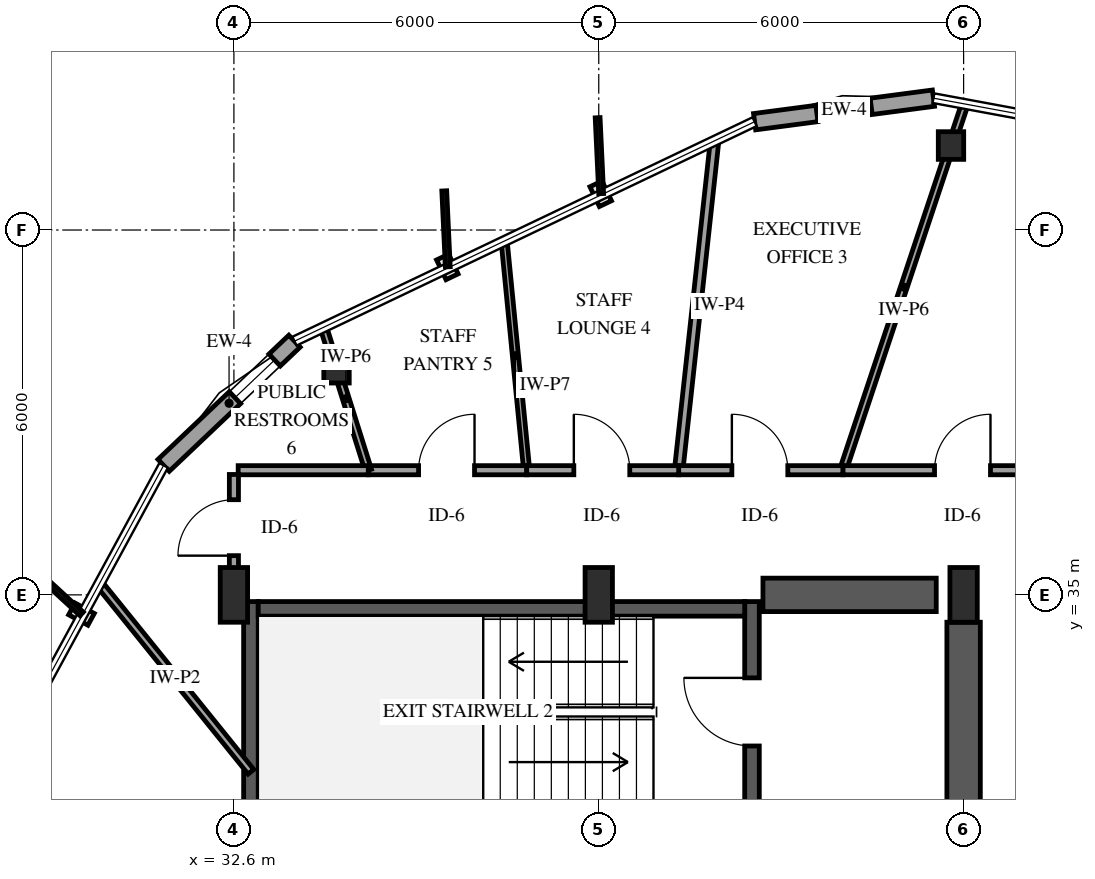
"""IFC4 building model, lengths in metres.
Left out: names, types, materials, properties, quantities, classifications, styles, units other than length and angle.
Written with IfcOpenShell. Run it as: python <this file> out.ifc"""

import sys

from ifc_helpers import new_model, si_unit, direction, frame, frame_2d, origin, origin_2d, place, context, subcontext, project, spatial, rectangle, i_section, extrude, element, fill, save


model = new_model("IFC4")
c1 = context("Model", 3, precision=1e-05, world=origin(), true_north=direction((0.0, 1.0)))
c2 = subcontext(c1, "Body", "Model", "MODEL_VIEW")
j1 = project(units=[si_unit("LENGTHUNIT", "METRE"), si_unit("PLANEANGLEUNIT", "RADIAN")], contexts=[c1])
p1 = place(None, origin())
s1 = spatial("IfcSite", under=j1, at=p1, CompositionType="ELEMENT")
p2 = place(p1, origin())
s2 = spatial("IfcBuilding", under=s1, at=p2, CompositionType="ELEMENT")
p3 = place(p2, frame((0.0, 0.0, 126.4)))
s3 = spatial("IfcBuildingStorey", under=s2, at=p3, CompositionType="ELEMENT", Elevation=126.4)
p4 = place(p3, frame((32.88, 31.26, 0.0), z_axis=(0.0, 0.0, 1.0), x_axis=(0.0, 1.0, 0.0)))
e1 = element("IfcWall", 1, at=p4, inside=s3, PredefinedType="SHEAR", context=c2, shape_type="SweptSolid", body=[
    extrude(rectangle(XDim=3.63, YDim=0.24, at=frame_2d((1.815, 0.0))), origin(), (0.0, 0.0, 1.0), 3.9),
])
p5 = place(p3, frame((41.12, 31.26, 0.0), z_axis=(0.0, 0.0, 1.0), x_axis=(0.0, 1.0, 0.0)))
e2 = element("IfcWall", 2, at=p5, inside=s3, PredefinedType="SHEAR", context=c2, shape_type="SweptSolid", body=[
    extrude(rectangle(XDim=3.63, YDim=0.24, at=frame_2d((1.815, 0.0))), origin(), (0.0, 0.0, 1.0), 3.9),
])
p6 = place(p5, frame((1.255, 0.0, 0.0)))
e3 = element("IfcOpeningElement", 3, at=p6, cuts=e2, PredefinedType="OPENING", context=c2, shape_type="SweptSolid", body=[
    extrude(rectangle(XDim=1.12, YDim=2.15, at=frame_2d((0.56, 1.075))), frame((0.0, 0.13, 0.0), z_axis=(0.0, -1.0, 0.0), x_axis=(1.0, 0.0, 0.0)), (0.0, 0.0, 1.0), 0.26),
])
p7 = place(p3, frame((33.0, 34.77, 0.0), z_axis=(0.0, 0.0, 1.0), x_axis=(1.0, 0.0, 0.0)))
e4 = element("IfcWall", 4, at=p7, inside=s3, PredefinedType="SHEAR", context=c2, shape_type="SweptSolid", body=[
    extrude(rectangle(XDim=8.0, YDim=0.24, at=frame_2d((4.0, 0.0))), origin(), (0.0, 0.0, 1.0), 3.9),
])
p8 = place(p3, frame((41.3, 35.0, 0.0), z_axis=(0.0, 0.0, 1.0), x_axis=(1.0, 0.0, 0.0)))
e5 = element("IfcWall", 5, at=p8, inside=s3, PredefinedType="SHEAR", context=c2, shape_type="SweptSolid", body=[
    extrude(rectangle(XDim=2.85, YDim=0.55, at=frame_2d((1.425, 0.0))), origin(), (0.0, 0.0, 1.0), 3.9),
])
p9 = place(p3, frame((44.6, 29.8, 0.0), z_axis=(0.0, 0.0, 1.0), x_axis=(0.0, 1.0, 0.0)))
e6 = element("IfcWall", 6, at=p9, inside=s3, PredefinedType="SHEAR", context=c2, shape_type="SweptSolid", body=[
    extrude(rectangle(XDim=4.75, YDim=0.55, at=frame_2d((2.375, 0.0))), origin(), (0.0, 0.0, 1.0), 3.9),
])
for number, where, z_axis, x_axis in (
    (7, (32.6, 35.0, 0.0), (0.0, 0.0, 1.0), (1.0, 0.0, 0.0)),
    (8, (38.6, 35.0, 0.0), (0.0, 0.0, 1.0), (1.0, 0.0, 0.0)),
    (9, (44.6, 35.0, 0.0), (0.0, 0.0, 1.0), (1.0, 0.0, 0.0)),
):
    element("IfcColumn", number, at=place(p3, frame(where, z_axis=z_axis, x_axis=x_axis)), inside=s3, PredefinedType="PILASTER", context=c2, shape_type="SweptSolid", body=[
        extrude(rectangle(XDim=0.45, YDim=0.9, at=origin_2d()), origin(), (0.0, 0.0, 1.0), 3.9),
    ])
for number, where, z_axis, x_axis in (
    (10, (44.393, 42.389, 0.0), (0.0, 0.0, 1.0), (1.0, 0.0, 0.0)),
    (11, (34.288, 38.711, 0.0), (0.0, 0.0, 1.0), (1.0, 0.0, 0.0)),
):
    element("IfcColumn", number, at=place(p3, frame(where, z_axis=z_axis, x_axis=x_axis)), inside=s3, PredefinedType="COLUMN", context=c2, shape_type="SweptSolid", body=[
        extrude(i_section(OverallWidth=0.418, OverallDepth=0.455, WebThickness=0.042, FlangeThickness=0.068, FilletRadius=0.038, at=origin_2d()), origin(), (0.0, 0.0, 1.0), 3.9),
    ])
p10 = place(p3, frame((44.104, 43.168, 0.0), z_axis=(0.0, 0.0, 1.0), x_axis=(-0.991434395997, -0.130605660036, 0.0)))
e12 = element("IfcWall", 12, at=p10, inside=s3, PredefinedType="SOLIDWALL", context=c2, shape_type="SweptSolid", body=[
    extrude(rectangle(XDim=2.967, YDim=0.27, at=frame_2d((1.483, 0.0))), origin(), (0.0, 0.0, 1.0), 2.979),
])
p11 = place(p10, frame((1.033, 0.0, 0.75)))
e13 = element("IfcOpeningElement", 13, at=p11, cuts=e12, PredefinedType="OPENING", context=c2, shape_type="SweptSolid", body=[
    extrude(rectangle(XDim=0.9, YDim=1.5, at=frame_2d((0.45, 0.75))), frame((0.0, 0.145, 0.0), z_axis=(0.0, -1.0, 0.0), x_axis=(1.0, 0.0, 0.0)), (0.0, 0.0, 1.0), 0.29),
])
p12 = place(p3, frame((33.596, 39.172, 0.0), z_axis=(0.0, 0.0, 1.0), x_axis=(-0.725340416539, -0.688390354476, 0.0)))
e14 = element("IfcWall", 14, at=p12, inside=s3, PredefinedType="SOLIDWALL", context=c2, shape_type="SweptSolid", body=[
    extrude(rectangle(XDim=2.967, YDim=0.27, at=frame_2d((1.483, 0.0))), origin(), (0.0, 0.0, 1.0), 2.979),
])
p13 = place(p12, frame((0.45, 0.0, 0.75)))
e15 = element("IfcOpeningElement", 15, at=p13, cuts=e14, PredefinedType="OPENING", context=c2, shape_type="SweptSolid", body=[
    extrude(rectangle(XDim=0.9, YDim=1.5, at=frame_2d((0.45, 0.75))), frame((0.0, 0.145, 0.0), z_axis=(0.0, -1.0, 0.0), x_axis=(1.0, 0.0, 0.0)), (0.0, 0.0, 1.0), 0.29),
])
p14 = place(p3, frame((42.614, 37.05, 0.0), z_axis=(0.0, 0.0, 1.0), x_axis=(0.316147007212, 0.948710213833, 0.0)))
e16 = element("IfcWall", 16, at=p14, inside=s3, PredefinedType="PARTITIONING", context=c2, shape_type="SweptSolid", body=[
    extrude(rectangle(XDim=6.349, YDim=0.11, at=frame_2d((3.174, 0.0))), origin(), (0.0, 0.0, 1.0), 2.895),
])
p15 = place(p3, frame((39.914, 37.05, 0.0), z_axis=(0.0, 0.0, 1.0), x_axis=(0.108424969243, 0.99410463536, 0.0)))
e17 = element("IfcWall", 17, at=p15, inside=s3, PredefinedType="PARTITIONING", context=c2, shape_type="SweptSolid", body=[
    extrude(rectangle(XDim=5.449, YDim=0.14, at=frame_2d((2.725, 0.0))), origin(), (0.0, 0.0, 1.0), 3.6),
])
p16 = place(p3, frame((32.88, 32.091, 0.0), z_axis=(0.0, 0.0, 1.0), x_axis=(-0.627801721524, 0.778373302761, 0.0)))
e18 = element("IfcWall", 18, at=p16, inside=s3, PredefinedType="PARTITIONING", context=c2, shape_type="SweptSolid", body=[
    extrude(rectangle(XDim=3.971, YDim=0.12, at=frame_2d((1.985, 0.0))), origin(), (0.0, 0.0, 1.0), 3.6),
])
p17 = place(p3, frame((42.614, 37.05, 0.0), z_axis=(0.0, 0.0, 1.0), x_axis=(1.0, 0.0, 0.0)))
e19 = element("IfcWall", 19, at=p17, inside=s3, PredefinedType="PARTITIONING", context=c2, shape_type="SweptSolid", body=[
    extrude(rectangle(XDim=3.966, YDim=0.15, at=frame_2d((1.983, 0.0))), origin(), (0.0, 0.0, 1.0), 3.6),
])
p18 = place(p17, frame((1.508, 0.0, 0.0)))
e20 = element("IfcOpeningElement", 20, at=p18, cuts=e19, PredefinedType="OPENING", context=c2, shape_type="SweptSolid", body=[
    extrude(rectangle(XDim=0.92, YDim=2.12, at=frame_2d((0.46, 1.06))), frame((0.0, 0.085, 0.0), z_axis=(0.0, -1.0, 0.0), x_axis=(1.0, 0.0, 0.0)), (0.0, 0.0, 1.0), 0.17),
])
p19 = place(p3, frame((37.415, 37.05, 0.0), z_axis=(0.0, 0.0, 1.0), x_axis=(-0.09804116838, 0.995182359823, 0.0)))
e21 = element("IfcWall", 21, at=p19, inside=s3, PredefinedType="PARTITIONING", context=c2, shape_type="SweptSolid", body=[
    extrude(rectangle(XDim=3.785, YDim=0.1, at=frame_2d((1.893, 0.0))), origin(), (0.0, 0.0, 1.0), 3.6),
])
p20 = place(p3, frame((39.914, 37.05, 0.0), z_axis=(0.0, 0.0, 1.0), x_axis=(1.0, 0.0, 0.0)))
e22 = element("IfcWall", 22, at=p20, inside=s3, PredefinedType="PARTITIONING", context=c2, shape_type="SweptSolid", body=[
    extrude(rectangle(XDim=2.7, YDim=0.15, at=frame_2d((1.35, 0.0))), origin(), (0.0, 0.0, 1.0), 3.6),
])
p21 = place(p20, frame((0.875, 0.0, 0.0)))
e23 = element("IfcOpeningElement", 23, at=p21, cuts=e22, PredefinedType="OPENING", context=c2, shape_type="SweptSolid", body=[
    extrude(rectangle(XDim=0.92, YDim=2.12, at=frame_2d((0.46, 1.06))), frame((0.0, 0.085, 0.0), z_axis=(0.0, -1.0, 0.0), x_axis=(1.0, 0.0, 0.0)), (0.0, 0.0, 1.0), 0.17),
])
p22 = place(p3, frame((34.81, 37.05, 0.0), z_axis=(0.0, 0.0, 1.0), x_axis=(1.0, 0.0, 0.0)))
e24 = element("IfcWall", 24, at=p22, inside=s3, PredefinedType="PARTITIONING", context=c2, shape_type="SweptSolid", body=[
    extrude(rectangle(XDim=2.605, YDim=0.15, at=frame_2d((1.302, 0.0))), origin(), (0.0, 0.0, 1.0), 3.6),
])
p23 = place(p22, frame((0.827, 0.0, 0.0)))
e25 = element("IfcOpeningElement", 25, at=p23, cuts=e24, PredefinedType="OPENING", context=c2, shape_type="SweptSolid", body=[
    extrude(rectangle(XDim=0.92, YDim=2.12, at=frame_2d((0.46, 1.06))), frame((0.0, 0.085, 0.0), z_axis=(0.0, -1.0, 0.0), x_axis=(1.0, 0.0, 0.0)), (0.0, 0.0, 1.0), 0.17),
])
p24 = place(p3, frame((37.415, 37.05, 0.0), z_axis=(0.0, 0.0, 1.0), x_axis=(1.0, 0.0, 0.0)))
e26 = element("IfcWall", 26, at=p24, inside=s3, PredefinedType="PARTITIONING", context=c2, shape_type="SweptSolid", body=[
    extrude(rectangle(XDim=2.499, YDim=0.15, at=frame_2d((1.25, 0.0))), origin(), (0.0, 0.0, 1.0), 3.6),
])
p25 = place(p24, frame((0.775, 0.0, 0.0)))
e27 = element("IfcOpeningElement", 27, at=p25, cuts=e26, PredefinedType="OPENING", context=c2, shape_type="SweptSolid", body=[
    extrude(rectangle(XDim=0.92, YDim=2.12, at=frame_2d((0.46, 1.06))), frame((0.0, 0.085, 0.0), z_axis=(0.0, -1.0, 0.0), x_axis=(1.0, 0.0, 0.0)), (0.0, 0.0, 1.0), 0.17),
])
p26 = place(p3, frame((34.81, 37.05, 0.0), z_axis=(0.0, 0.0, 1.0), x_axis=(-0.300120490278, 0.953901300615, 0.0)))
e28 = element("IfcWall", 28, at=p26, inside=s3, PredefinedType="PARTITIONING", context=c2, shape_type="SweptSolid", body=[
    extrude(rectangle(XDim=2.462, YDim=0.11, at=frame_2d((1.231, 0.0))), origin(), (0.0, 0.0, 1.0), 2.895),
])
p27 = place(p3, frame((32.67, 37.05, 0.0), z_axis=(0.0, 0.0, 1.0), x_axis=(1.0, 0.0, 0.0)))
e29 = element("IfcWall", 29, at=p27, inside=s3, PredefinedType="PARTITIONING", context=c2, shape_type="SweptSolid", body=[
    extrude(rectangle(XDim=2.14, YDim=0.15, at=frame_2d((1.07, 0.0))), origin(), (0.0, 0.0, 1.0), 3.6),
])
p28 = place(p3, frame((32.6, 35.07, 0.0), z_axis=(0.0, 0.0, 1.0), x_axis=(0.0, 1.0, 0.0)))
e30 = element("IfcWall", 30, at=p28, inside=s3, PredefinedType="PARTITIONING", context=c2, shape_type="SweptSolid", body=[
    extrude(rectangle(XDim=1.91, YDim=0.15, at=frame_2d((0.955, 0.0))), origin(), (0.0, 0.0, 1.0), 3.6),
])
p29 = place(p28, frame((0.575, 0.0, 0.0)))
e31 = element("IfcOpeningElement", 31, at=p29, cuts=e30, PredefinedType="OPENING", context=c2, shape_type="SweptSolid", body=[
    extrude(rectangle(XDim=0.92, YDim=2.12, at=frame_2d((0.46, 1.06))), frame((0.0, 0.085, 0.0), z_axis=(0.0, -1.0, 0.0), x_axis=(1.0, 0.0, 0.0)), (0.0, 0.0, 1.0), 0.17),
])
p30 = place(p11, origin())
e32 = element("IfcWindow", 32, at=p30, inside=s3, PartitioningType="SINGLE_PANEL", PredefinedType="WINDOW", context=c2, shape_type="SweptSolid", body=[
    extrude(rectangle(XDim=0.9, YDim=1.5, at=frame_2d((0.45, 0.75))), frame((0.0, 0.03, 0.0), z_axis=(0.0, -1.0, 0.0), x_axis=(1.0, 0.0, 0.0)), (0.0, 0.0, 1.0), 0.06),
])
fill(e13, e32)
p31 = place(p13, origin())
e33 = element("IfcWindow", 33, at=p31, inside=s3, PartitioningType="SINGLE_PANEL", PredefinedType="WINDOW", context=c2, shape_type="SweptSolid", body=[
    extrude(rectangle(XDim=0.9, YDim=1.5, at=frame_2d((0.45, 0.75))), frame((0.0, 0.03, 0.0), z_axis=(0.0, -1.0, 0.0), x_axis=(1.0, 0.0, 0.0)), (0.0, 0.0, 1.0), 0.06),
])
fill(e15, e33)
p32 = place(p6, origin())
e34 = element("IfcDoor", 34, at=p32, inside=s3, OperationType="SINGLE_SWING_RIGHT", PredefinedType="DOOR", context=c2, shape_type="SweptSolid", body=[
    extrude(rectangle(XDim=1.12, YDim=2.15, at=frame_2d((0.56, 1.075))), frame((0.0, 0.025, 0.0), z_axis=(0.0, -1.0, 0.0), x_axis=(1.0, 0.0, 0.0)), (0.0, 0.0, 1.0), 0.05),
])
fill(e3, e34)
p33 = place(p18, origin())
e35 = element("IfcDoor", 35, at=p33, inside=s3, OperationType="SINGLE_SWING_RIGHT", PredefinedType="DOOR", context=c2, shape_type="SweptSolid", body=[
    extrude(rectangle(XDim=0.92, YDim=2.12, at=frame_2d((0.46, 1.06))), frame((0.0, 0.025, 0.0), z_axis=(0.0, -1.0, 0.0), x_axis=(1.0, 0.0, 0.0)), (0.0, 0.0, 1.0), 0.05),
])
fill(e20, e35)
p34 = place(p21, origin())
e36 = element("IfcDoor", 36, at=p34, inside=s3, OperationType="SINGLE_SWING_LEFT", PredefinedType="DOOR", context=c2, shape_type="SweptSolid", body=[
    extrude(rectangle(XDim=0.92, YDim=2.12, at=frame_2d((0.46, 1.06))), frame((0.0, 0.025, 0.0), z_axis=(0.0, -1.0, 0.0), x_axis=(1.0, 0.0, 0.0)), (0.0, 0.0, 1.0), 0.05),
])
fill(e23, e36)
p35 = place(p23, origin())
e37 = element("IfcDoor", 37, at=p35, inside=s3, OperationType="SINGLE_SWING_RIGHT", PredefinedType="DOOR", context=c2, shape_type="SweptSolid", body=[
    extrude(rectangle(XDim=0.92, YDim=2.12, at=frame_2d((0.46, 1.06))), frame((0.0, 0.025, 0.0), z_axis=(0.0, -1.0, 0.0), x_axis=(1.0, 0.0, 0.0)), (0.0, 0.0, 1.0), 0.05),
])
fill(e25, e37)
p36 = place(p25, origin())
e38 = element("IfcDoor", 38, at=p36, inside=s3, OperationType="SINGLE_SWING_LEFT", PredefinedType="DOOR", context=c2, shape_type="SweptSolid", body=[
    extrude(rectangle(XDim=0.92, YDim=2.12, at=frame_2d((0.46, 1.06))), frame((0.0, 0.025, 0.0), z_axis=(0.0, -1.0, 0.0), x_axis=(1.0, 0.0, 0.0)), (0.0, 0.0, 1.0), 0.05),
])
fill(e27, e38)
p37 = place(p29, origin())
e39 = element("IfcDoor", 39, at=p37, inside=s3, OperationType="SINGLE_SWING_LEFT", PredefinedType="DOOR", context=c2, shape_type="SweptSolid", body=[
    extrude(rectangle(XDim=0.92, YDim=2.12, at=frame_2d((0.46, 1.06))), frame((0.0, 0.025, 0.0), z_axis=(0.0, -1.0, 0.0), x_axis=(1.0, 0.0, 0.0)), (0.0, 0.0, 1.0), 0.05),
])
fill(e31, e39)
save(model, sys.argv[1])
